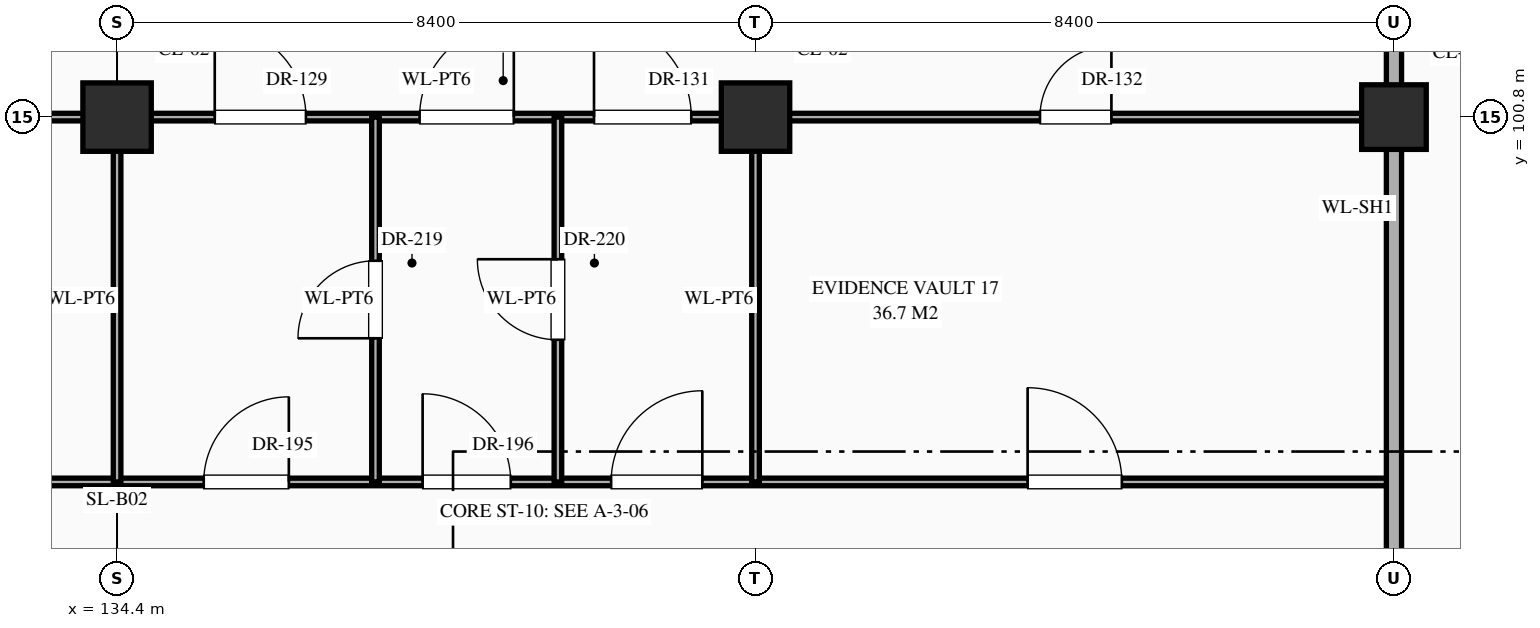
"""IFC4 building model, lengths in metres.
Left out: names, types, materials, properties, quantities, classifications, styles, units other than length and angle.
Written with IfcOpenShell. Run it as: python <this file> out.ifc"""

import sys

from ifc_helpers import new_model, si_unit, direction, frame, frame_2d, origin, origin_2d, place, context, subcontext, project, spatial, rectangle, extrude, element, fill, save


model = new_model("IFC4")
c1 = context("Model", 3, precision=1e-05, world=origin(), true_north=direction((0.0, 1.0)))
c2 = subcontext(c1, "Body", "Model", "MODEL_VIEW")
j1 = project(units=[si_unit("LENGTHUNIT", "METRE"), si_unit("PLANEANGLEUNIT", "RADIAN")], contexts=[c1])
p1 = place(None, origin())
s1 = spatial("IfcSite", under=j1, at=p1, CompositionType="ELEMENT")
p2 = place(p1, origin())
s2 = spatial("IfcBuilding", under=s1, at=p2, CompositionType="ELEMENT")
p3 = place(p2, frame((0.0, 0.0, -10.2)))
s3 = spatial("IfcBuildingStorey", under=s2, at=p3, CompositionType="ELEMENT", Elevation=-10.2)
for number, where, z_axis, x_axis in (
    (1, (134.4, 100.8, 0.0), (0.0, 0.0, 1.0), (1.0, 0.0, 0.0)),
    (2, (142.8, 100.8, 0.0), (0.0, 0.0, 1.0), (1.0, 0.0, 0.0)),
):
    element("IfcColumn", number, at=place(p3, frame(where, z_axis=z_axis, x_axis=x_axis)), inside=s3, PredefinedType="COLUMN", context=c2, shape_type="SweptSolid", body=[
        extrude(rectangle(XDim=0.9, YDim=0.9, at=origin_2d()), origin(), (0.0, 0.0, 1.0), 4.8),
    ])
p4 = place(p3, frame((151.2, 100.8, 0.0), z_axis=(0.0, 0.0, 1.0), x_axis=(1.0, 0.0, 0.0)))
e3 = element("IfcColumn", 3, at=p4, inside=s3, PredefinedType="COLUMN", context=c2, shape_type="SweptSolid", body=[
    extrude(rectangle(XDim=0.85, YDim=0.85, at=origin_2d()), origin(), (0.0, 0.0, 1.0), 4.8),
])
p5 = place(p3, frame((0.04, 96.0, 0.0), z_axis=(0.0, 0.0, 1.0), x_axis=(1.0, 0.0, 0.0)))
e4 = element("IfcWall", 4, at=p5, inside=s3, PredefinedType="STANDARD", context=c2, shape_type="SweptSolid", body=[
    extrude(rectangle(XDim=151.16, YDim=0.1, at=frame_2d((75.58, 0.0))), origin(), (0.0, 0.0, 1.0), 4.48),
])
p6 = place(p5, frame((1.04, 0.0, 0.0)))
e5 = element("IfcOpeningElement", 5, at=p6, cuts=e4, PredefinedType="OPENING", context=c2, shape_type="SweptSolid", body=[
    extrude(rectangle(XDim=1.28, YDim=2.35, at=frame_2d((0.64, 1.175))), frame((0.0, 0.062, 0.0), z_axis=(0.0, -1.0, 0.0), x_axis=(1.0, 0.0, 0.0)), (0.0, 0.0, 1.0), 0.124),
])
p7 = place(p5, frame((4.09, 0.0, 0.0)))
e6 = element("IfcOpeningElement", 6, at=p7, cuts=e4, PredefinedType="OPENING", context=c2, shape_type="SweptSolid", body=[
    extrude(rectangle(XDim=0.94, YDim=2.3, at=frame_2d((0.47, 1.15))), frame((0.0, 0.062, 0.0), z_axis=(0.0, -1.0, 0.0), x_axis=(1.0, 0.0, 0.0)), (0.0, 0.0, 1.0), 0.124),
])
p8 = place(p5, frame((6.57, 0.0, 0.0)))
e7 = element("IfcOpeningElement", 7, at=p8, cuts=e4, PredefinedType="OPENING", context=c2, shape_type="SweptSolid", body=[
    extrude(rectangle(XDim=0.98, YDim=2.35, at=frame_2d((0.49, 1.175))), frame((0.0, 0.062, 0.0), z_axis=(0.0, -1.0, 0.0), x_axis=(1.0, 0.0, 0.0)), (0.0, 0.0, 1.0), 0.124),
])
p9 = place(p5, frame((12.05, 0.0, 0.0)))
e8 = element("IfcOpeningElement", 8, at=p9, cuts=e4, PredefinedType="OPENING", context=c2, shape_type="SweptSolid", body=[
    extrude(rectangle(XDim=1.02, YDim=2.4, at=frame_2d((0.51, 1.2))), frame((0.0, 0.062, 0.0), z_axis=(0.0, -1.0, 0.0), x_axis=(1.0, 0.0, 0.0)), (0.0, 0.0, 1.0), 0.124),
])
p10 = place(p5, frame((20.43, 0.0, 0.0)))
e9 = element("IfcOpeningElement", 9, at=p10, cuts=e4, PredefinedType="OPENING", context=c2, shape_type="SweptSolid", body=[
    extrude(rectangle(XDim=1.06, YDim=2.4, at=frame_2d((0.53, 1.2))), frame((0.0, 0.062, 0.0), z_axis=(0.0, -1.0, 0.0), x_axis=(1.0, 0.0, 0.0)), (0.0, 0.0, 1.0), 0.124),
])
p11 = place(p5, frame((26.29, 0.0, 0.0)))
e10 = element("IfcOpeningElement", 10, at=p11, cuts=e4, PredefinedType="OPENING", context=c2, shape_type="SweptSolid", body=[
    extrude(rectangle(XDim=1.14, YDim=2.4, at=frame_2d((0.57, 1.2))), frame((0.0, 0.062, 0.0), z_axis=(0.0, -1.0, 0.0), x_axis=(1.0, 0.0, 0.0)), (0.0, 0.0, 1.0), 0.124),
])
p12 = place(p5, frame((29.31, 0.0, 0.0)))
e11 = element("IfcOpeningElement", 11, at=p12, cuts=e4, PredefinedType="OPENING", context=c2, shape_type="SweptSolid", body=[
    extrude(rectangle(XDim=0.9, YDim=2.15, at=frame_2d((0.45, 1.075))), frame((0.0, 0.062, 0.0), z_axis=(0.0, -1.0, 0.0), x_axis=(1.0, 0.0, 0.0)), (0.0, 0.0, 1.0), 0.124),
])
p13 = place(p5, frame((31.83, 0.0, 0.0)))
e12 = element("IfcOpeningElement", 12, at=p13, cuts=e4, PredefinedType="OPENING", context=c2, shape_type="SweptSolid", body=[
    extrude(rectangle(XDim=0.86, YDim=2.1, at=frame_2d((0.43, 1.05))), frame((0.0, 0.062, 0.0), z_axis=(0.0, -1.0, 0.0), x_axis=(1.0, 0.0, 0.0)), (0.0, 0.0, 1.0), 0.124),
])
p14 = place(p5, frame((37.3, 0.0, 0.0)))
e13 = element("IfcOpeningElement", 13, at=p14, cuts=e4, PredefinedType="OPENING", context=c2, shape_type="SweptSolid", body=[
    extrude(rectangle(XDim=0.92, YDim=2.15, at=frame_2d((0.46, 1.075))), frame((0.0, 0.062, 0.0), z_axis=(0.0, -1.0, 0.0), x_axis=(1.0, 0.0, 0.0)), (0.0, 0.0, 1.0), 0.124),
])
p15 = place(p5, frame((45.68, 0.0, 0.0)))
e14 = element("IfcOpeningElement", 14, at=p15, cuts=e4, PredefinedType="OPENING", context=c2, shape_type="SweptSolid", body=[
    extrude(rectangle(XDim=0.96, YDim=2.2, at=frame_2d((0.48, 1.1))), frame((0.0, 0.062, 0.0), z_axis=(0.0, -1.0, 0.0), x_axis=(1.0, 0.0, 0.0)), (0.0, 0.0, 1.0), 0.124),
])
p16 = place(p5, frame((51.57, 0.0, 0.0)))
e15 = element("IfcOpeningElement", 15, at=p16, cuts=e4, PredefinedType="OPENING", context=c2, shape_type="SweptSolid", body=[
    extrude(rectangle(XDim=0.98, YDim=2.35, at=frame_2d((0.49, 1.175))), frame((0.0, 0.062, 0.0), z_axis=(0.0, -1.0, 0.0), x_axis=(1.0, 0.0, 0.0)), (0.0, 0.0, 1.0), 0.124),
])
p17 = place(p5, frame((54.45, 0.0, 0.0)))
e16 = element("IfcOpeningElement", 16, at=p17, cuts=e4, PredefinedType="OPENING", context=c2, shape_type="SweptSolid", body=[
    extrude(rectangle(XDim=1.02, YDim=2.4, at=frame_2d((0.51, 1.2))), frame((0.0, 0.062, 0.0), z_axis=(0.0, -1.0, 0.0), x_axis=(1.0, 0.0, 0.0)), (0.0, 0.0, 1.0), 0.124),
])
p18 = place(p5, frame((56.93, 0.0, 0.0)))
e17 = element("IfcOpeningElement", 17, at=p18, cuts=e4, PredefinedType="OPENING", context=c2, shape_type="SweptSolid", body=[
    extrude(rectangle(XDim=1.06, YDim=2.4, at=frame_2d((0.53, 1.2))), frame((0.0, 0.062, 0.0), z_axis=(0.0, -1.0, 0.0), x_axis=(1.0, 0.0, 0.0)), (0.0, 0.0, 1.0), 0.124),
])
p19 = place(p5, frame((62.39, 0.0, 0.0)))
e18 = element("IfcOpeningElement", 18, at=p19, cuts=e4, PredefinedType="OPENING", context=c2, shape_type="SweptSolid", body=[
    extrude(rectangle(XDim=1.14, YDim=2.4, at=frame_2d((0.57, 1.2))), frame((0.0, 0.062, 0.0), z_axis=(0.0, -1.0, 0.0), x_axis=(1.0, 0.0, 0.0)), (0.0, 0.0, 1.0), 0.124),
])
p20 = place(p5, frame((70.91, 0.0, 0.0)))
e19 = element("IfcOpeningElement", 19, at=p20, cuts=e4, PredefinedType="OPENING", context=c2, shape_type="SweptSolid", body=[
    extrude(rectangle(XDim=0.9, YDim=2.15, at=frame_2d((0.45, 1.075))), frame((0.0, 0.062, 0.0), z_axis=(0.0, -1.0, 0.0), x_axis=(1.0, 0.0, 0.0)), (0.0, 0.0, 1.0), 0.124),
])
p21 = place(p5, frame((79.33, 0.0, 0.0)))
e20 = element("IfcOpeningElement", 20, at=p21, cuts=e4, PredefinedType="OPENING", context=c2, shape_type="SweptSolid", body=[
    extrude(rectangle(XDim=0.86, YDim=2.1, at=frame_2d((0.43, 1.05))), frame((0.0, 0.062, 0.0), z_axis=(0.0, -1.0, 0.0), x_axis=(1.0, 0.0, 0.0)), (0.0, 0.0, 1.0), 0.124),
])
p22 = place(p5, frame((85.1, 0.0, 0.0)))
e21 = element("IfcOpeningElement", 21, at=p22, cuts=e4, PredefinedType="OPENING", context=c2, shape_type="SweptSolid", body=[
    extrude(rectangle(XDim=1.12, YDim=2.25, at=frame_2d((0.56, 1.125))), frame((0.0, 0.062, 0.0), z_axis=(0.0, -1.0, 0.0), x_axis=(1.0, 0.0, 0.0)), (0.0, 0.0, 1.0), 0.124),
])
p23 = place(p5, frame((87.98, 0.0, 0.0)))
e22 = element("IfcOpeningElement", 22, at=p23, cuts=e4, PredefinedType="OPENING", context=c2, shape_type="SweptSolid", body=[
    extrude(rectangle(XDim=1.16, YDim=2.3, at=frame_2d((0.58, 1.15))), frame((0.0, 0.062, 0.0), z_axis=(0.0, -1.0, 0.0), x_axis=(1.0, 0.0, 0.0)), (0.0, 0.0, 1.0), 0.124),
])
p24 = place(p5, frame((90.46, 0.0, 0.0)))
e23 = element("IfcOpeningElement", 23, at=p24, cuts=e4, PredefinedType="OPENING", context=c2, shape_type="SweptSolid", body=[
    extrude(rectangle(XDim=1.2, YDim=2.35, at=frame_2d((0.6, 1.175))), frame((0.0, 0.062, 0.0), z_axis=(0.0, -1.0, 0.0), x_axis=(1.0, 0.0, 0.0)), (0.0, 0.0, 1.0), 0.124),
])
p25 = place(p5, frame((95.94, 0.0, 0.0)))
e24 = element("IfcOpeningElement", 24, at=p25, cuts=e4, PredefinedType="OPENING", context=c2, shape_type="SweptSolid", body=[
    extrude(rectangle(XDim=1.24, YDim=2.3, at=frame_2d((0.62, 1.15))), frame((0.0, 0.062, 0.0), z_axis=(0.0, -1.0, 0.0), x_axis=(1.0, 0.0, 0.0)), (0.0, 0.0, 1.0), 0.124),
])
p26 = place(p5, frame((104.32, 0.0, 0.0)))
e25 = element("IfcOpeningElement", 25, at=p26, cuts=e4, PredefinedType="OPENING", context=c2, shape_type="SweptSolid", body=[
    extrude(rectangle(XDim=1.28, YDim=2.35, at=frame_2d((0.64, 1.175))), frame((0.0, 0.062, 0.0), z_axis=(0.0, -1.0, 0.0), x_axis=(1.0, 0.0, 0.0)), (0.0, 0.0, 1.0), 0.124),
])
p27 = place(p5, frame((110.39, 0.0, 0.0)))
e26 = element("IfcOpeningElement", 26, at=p27, cuts=e4, PredefinedType="OPENING", context=c2, shape_type="SweptSolid", body=[
    extrude(rectangle(XDim=0.94, YDim=2.3, at=frame_2d((0.47, 1.15))), frame((0.0, 0.062, 0.0), z_axis=(0.0, -1.0, 0.0), x_axis=(1.0, 0.0, 0.0)), (0.0, 0.0, 1.0), 0.124),
])
p28 = place(p5, frame((113.27, 0.0, 0.0)))
e27 = element("IfcOpeningElement", 27, at=p28, cuts=e4, PredefinedType="OPENING", context=c2, shape_type="SweptSolid", body=[
    extrude(rectangle(XDim=0.98, YDim=2.35, at=frame_2d((0.49, 1.175))), frame((0.0, 0.062, 0.0), z_axis=(0.0, -1.0, 0.0), x_axis=(1.0, 0.0, 0.0)), (0.0, 0.0, 1.0), 0.124),
])
p29 = place(p5, frame((115.75, 0.0, 0.0)))
e28 = element("IfcOpeningElement", 28, at=p29, cuts=e4, PredefinedType="OPENING", context=c2, shape_type="SweptSolid", body=[
    extrude(rectangle(XDim=1.02, YDim=2.4, at=frame_2d((0.51, 1.2))), frame((0.0, 0.062, 0.0), z_axis=(0.0, -1.0, 0.0), x_axis=(1.0, 0.0, 0.0)), (0.0, 0.0, 1.0), 0.124),
])
p30 = place(p5, frame((121.24, 0.0, 0.0)))
e29 = element("IfcOpeningElement", 29, at=p30, cuts=e4, PredefinedType="OPENING", context=c2, shape_type="SweptSolid", body=[
    extrude(rectangle(XDim=1.04, YDim=2.2, at=frame_2d((0.52, 1.1))), frame((0.0, 0.062, 0.0), z_axis=(0.0, -1.0, 0.0), x_axis=(1.0, 0.0, 0.0)), (0.0, 0.0, 1.0), 0.124),
])
p31 = place(p5, frame((129.62, 0.0, 0.0)))
e30 = element("IfcOpeningElement", 30, at=p31, cuts=e4, PredefinedType="OPENING", context=c2, shape_type="SweptSolid", body=[
    extrude(rectangle(XDim=1.08, YDim=2.25, at=frame_2d((0.54, 1.125))), frame((0.0, 0.062, 0.0), z_axis=(0.0, -1.0, 0.0), x_axis=(1.0, 0.0, 0.0)), (0.0, 0.0, 1.0), 0.124),
])
p32 = place(p5, frame((135.5, 0.0, 0.0)))
e31 = element("IfcOpeningElement", 31, at=p32, cuts=e4, PredefinedType="OPENING", context=c2, shape_type="SweptSolid", body=[
    extrude(rectangle(XDim=1.12, YDim=2.25, at=frame_2d((0.56, 1.125))), frame((0.0, 0.062, 0.0), z_axis=(0.0, -1.0, 0.0), x_axis=(1.0, 0.0, 0.0)), (0.0, 0.0, 1.0), 0.124),
])
p33 = place(p5, frame((138.38, 0.0, 0.0)))
e32 = element("IfcOpeningElement", 32, at=p33, cuts=e4, PredefinedType="OPENING", context=c2, shape_type="SweptSolid", body=[
    extrude(rectangle(XDim=1.16, YDim=2.3, at=frame_2d((0.58, 1.15))), frame((0.0, 0.062, 0.0), z_axis=(0.0, -1.0, 0.0), x_axis=(1.0, 0.0, 0.0)), (0.0, 0.0, 1.0), 0.124),
])
p34 = place(p5, frame((140.86, 0.0, 0.0)))
e33 = element("IfcOpeningElement", 33, at=p34, cuts=e4, PredefinedType="OPENING", context=c2, shape_type="SweptSolid", body=[
    extrude(rectangle(XDim=1.2, YDim=2.35, at=frame_2d((0.6, 1.175))), frame((0.0, 0.062, 0.0), z_axis=(0.0, -1.0, 0.0), x_axis=(1.0, 0.0, 0.0)), (0.0, 0.0, 1.0), 0.124),
])
p35 = place(p5, frame((146.34, 0.0, 0.0)))
e34 = element("IfcOpeningElement", 34, at=p35, cuts=e4, PredefinedType="OPENING", context=c2, shape_type="SweptSolid", body=[
    extrude(rectangle(XDim=1.24, YDim=2.3, at=frame_2d((0.62, 1.15))), frame((0.0, 0.062, 0.0), z_axis=(0.0, -1.0, 0.0), x_axis=(1.0, 0.0, 0.0)), (0.0, 0.0, 1.0), 0.124),
])
p36 = place(p3, frame((126.0, 100.8, 0.0), z_axis=(0.0, 0.0, 1.0), x_axis=(1.0, 0.0, 0.0)))
e35 = element("IfcWall", 35, at=p36, inside=s3, PredefinedType="STANDARD", context=c2, shape_type="SweptSolid", body=[
    extrude(rectangle(XDim=25.2, YDim=0.1, at=frame_2d((12.6, 0.0))), origin(), (0.0, 0.0, 1.0), 3.63),
])
p37 = place(p36, frame((3.62, 0.0, 0.0)))
e36 = element("IfcOpeningElement", 36, at=p37, cuts=e35, PredefinedType="OPENING", context=c2, shape_type="SweptSolid", body=[
    extrude(rectangle(XDim=1.16, YDim=2.3, at=frame_2d((0.58, 1.15))), frame((0.0, 0.062, 0.0), z_axis=(0.0, -1.0, 0.0), x_axis=(1.0, 0.0, 0.0)), (0.0, 0.0, 1.0), 0.124),
])
p38 = place(p36, frame((9.685, 0.0, 0.0)))
e37 = element("IfcOpeningElement", 37, at=p38, cuts=e35, PredefinedType="OPENING", context=c2, shape_type="SweptSolid", body=[
    extrude(rectangle(XDim=1.2, YDim=2.35, at=frame_2d((0.6, 1.175))), frame((0.0, 0.062, 0.0), z_axis=(0.0, -1.0, 0.0), x_axis=(1.0, 0.0, 0.0)), (0.0, 0.0, 1.0), 0.124),
])
p39 = place(p36, frame((12.38, 0.0, 0.0)))
e38 = element("IfcOpeningElement", 38, at=p39, cuts=e35, PredefinedType="OPENING", context=c2, shape_type="SweptSolid", body=[
    extrude(rectangle(XDim=1.24, YDim=2.3, at=frame_2d((0.62, 1.15))), frame((0.0, 0.062, 0.0), z_axis=(0.0, -1.0, 0.0), x_axis=(1.0, 0.0, 0.0)), (0.0, 0.0, 1.0), 0.124),
])
p40 = place(p36, frame((14.675, 0.0, 0.0)))
e39 = element("IfcOpeningElement", 39, at=p40, cuts=e35, PredefinedType="OPENING", context=c2, shape_type="SweptSolid", body=[
    extrude(rectangle(XDim=1.28, YDim=2.35, at=frame_2d((0.64, 1.175))), frame((0.0, 0.062, 0.0), z_axis=(0.0, -1.0, 0.0), x_axis=(1.0, 0.0, 0.0)), (0.0, 0.0, 1.0), 0.124),
])
p41 = place(p36, frame((20.542, 0.0, 0.0)))
e40 = element("IfcOpeningElement", 40, at=p41, cuts=e35, PredefinedType="OPENING", context=c2, shape_type="SweptSolid", body=[
    extrude(rectangle(XDim=0.94, YDim=2.3, at=frame_2d((0.47, 1.15))), frame((0.0, 0.062, 0.0), z_axis=(0.0, -1.0, 0.0), x_axis=(1.0, 0.0, 0.0)), (0.0, 0.0, 1.0), 0.124),
])
p42 = place(p3, frame((134.4, 96.0, 0.0), z_axis=(0.0, 0.0, 1.0), x_axis=(0.0, 1.0, 0.0)))
e41 = element("IfcWall", 41, at=p42, inside=s3, PredefinedType="STANDARD", context=c2, shape_type="SweptSolid", body=[
    extrude(rectangle(XDim=4.8, YDim=0.1, at=frame_2d((2.4, 0.0))), origin(), (0.0, 0.0, 1.0), 3.73),
])
p43 = place(p3, frame((137.8, 96.0, 0.0), z_axis=(0.0, 0.0, 1.0), x_axis=(0.0, 1.0, 0.0)))
e42 = element("IfcWall", 42, at=p43, inside=s3, PredefinedType="STANDARD", context=c2, shape_type="SweptSolid", body=[
    extrude(rectangle(XDim=4.8, YDim=0.1, at=frame_2d((2.4, 0.0))), origin(), (0.0, 0.0, 1.0), 4.48),
])
p44 = place(p43, frame((1.89, 0.0, 0.0)))
e43 = element("IfcOpeningElement", 43, at=p44, cuts=e42, PredefinedType="OPENING", context=c2, shape_type="SweptSolid", body=[
    extrude(rectangle(XDim=1.02, YDim=2.4, at=frame_2d((0.51, 1.2))), frame((0.0, 0.062, 0.0), z_axis=(0.0, -1.0, 0.0), x_axis=(1.0, 0.0, 0.0)), (0.0, 0.0, 1.0), 0.124),
])
p45 = place(p3, frame((140.2, 96.0, 0.0), z_axis=(0.0, 0.0, 1.0), x_axis=(0.0, 1.0, 0.0)))
e44 = element("IfcWall", 44, at=p45, inside=s3, PredefinedType="STANDARD", context=c2, shape_type="SweptSolid", body=[
    extrude(rectangle(XDim=4.8, YDim=0.1, at=frame_2d((2.4, 0.0))), origin(), (0.0, 0.0, 1.0), 4.48),
])
p46 = place(p45, frame((1.87, 0.0, 0.0)))
e45 = element("IfcOpeningElement", 45, at=p46, cuts=e44, PredefinedType="OPENING", context=c2, shape_type="SweptSolid", body=[
    extrude(rectangle(XDim=1.06, YDim=2.4, at=frame_2d((0.53, 1.2))), frame((0.0, 0.062, 0.0), z_axis=(0.0, -1.0, 0.0), x_axis=(1.0, 0.0, 0.0)), (0.0, 0.0, 1.0), 0.124),
])
p47 = place(p3, frame((142.8, 96.0, 0.0), z_axis=(0.0, 0.0, 1.0), x_axis=(0.0, 1.0, 0.0)))
e46 = element("IfcWall", 46, at=p47, inside=s3, PredefinedType="STANDARD", context=c2, shape_type="SweptSolid", body=[
    extrude(rectangle(XDim=4.8, YDim=0.1, at=frame_2d((2.4, 0.0))), origin(), (0.0, 0.0, 1.0), 3.73),
])
p48 = place(p3, frame((151.2, 91.2, 0.0), z_axis=(0.0, 0.0, 1.0), x_axis=(0.0, 1.0, 0.0)))
e47 = element("IfcWall", 47, at=p48, inside=s3, PredefinedType="STANDARD", context=c2, shape_type="SweptSolid", body=[
    extrude(rectangle(XDim=16.8, YDim=0.2, at=frame_2d((8.4, 0.0))), origin(), (0.0, 0.0, 1.0), 3.73),
])
p49 = place(p38, origin())
e48 = element("IfcDoor", 48, at=p49, inside=s3, OperationType="SINGLE_SWING_LEFT", PredefinedType="DOOR", context=c2, shape_type="SweptSolid", body=[
    extrude(rectangle(XDim=1.2, YDim=2.35, at=frame_2d((0.6, 1.175))), frame((0.0, 0.025, 0.0), z_axis=(0.0, -1.0, 0.0), x_axis=(1.0, 0.0, 0.0)), (0.0, 0.0, 1.0), 0.05),
])
fill(e37, e48)
p50 = place(p39, origin())
e49 = element("IfcDoor", 49, at=p50, inside=s3, OperationType="SINGLE_SWING_RIGHT", PredefinedType="DOOR", context=c2, shape_type="SweptSolid", body=[
    extrude(rectangle(XDim=1.24, YDim=2.3, at=frame_2d((0.62, 1.15))), frame((0.0, 0.025, 0.0), z_axis=(0.0, -1.0, 0.0), x_axis=(1.0, 0.0, 0.0)), (0.0, 0.0, 1.0), 0.05),
])
fill(e38, e49)
p51 = place(p40, origin())
e50 = element("IfcDoor", 50, at=p51, inside=s3, OperationType="SINGLE_SWING_LEFT", PredefinedType="DOOR", context=c2, shape_type="SweptSolid", body=[
    extrude(rectangle(XDim=1.28, YDim=2.35, at=frame_2d((0.64, 1.175))), frame((0.0, 0.025, 0.0), z_axis=(0.0, -1.0, 0.0), x_axis=(1.0, 0.0, 0.0)), (0.0, 0.0, 1.0), 0.05),
])
fill(e39, e50)
p52 = place(p41, origin())
e51 = element("IfcDoor", 51, at=p52, inside=s3, OperationType="SINGLE_SWING_RIGHT", PredefinedType="DOOR", context=c2, shape_type="SweptSolid", body=[
    extrude(rectangle(XDim=0.94, YDim=2.3, at=frame_2d((0.47, 1.15))), frame((0.0, 0.025, 0.0), z_axis=(0.0, -1.0, 0.0), x_axis=(1.0, 0.0, 0.0)), (0.0, 0.0, 1.0), 0.05),
])
fill(e40, e51)
p53 = place(p32, origin())
e52 = element("IfcDoor", 52, at=p53, inside=s3, OperationType="SINGLE_SWING_RIGHT", PredefinedType="DOOR", context=c2, shape_type="SweptSolid", body=[
    extrude(rectangle(XDim=1.12, YDim=2.25, at=frame_2d((0.56, 1.125))), frame((0.0, 0.025, 0.0), z_axis=(0.0, -1.0, 0.0), x_axis=(1.0, 0.0, 0.0)), (0.0, 0.0, 1.0), 0.05),
])
fill(e31, e52)
p54 = place(p33, origin())
e53 = element("IfcDoor", 53, at=p54, inside=s3, OperationType="SINGLE_SWING_LEFT", PredefinedType="DOOR", context=c2, shape_type="SweptSolid", body=[
    extrude(rectangle(XDim=1.16, YDim=2.3, at=frame_2d((0.58, 1.15))), frame((0.0, 0.025, 0.0), z_axis=(0.0, -1.0, 0.0), x_axis=(1.0, 0.0, 0.0)), (0.0, 0.0, 1.0), 0.05),
])
fill(e32, e53)
p55 = place(p34, origin())
e54 = element("IfcDoor", 54, at=p55, inside=s3, OperationType="SINGLE_SWING_RIGHT", PredefinedType="DOOR", context=c2, shape_type="SweptSolid", body=[
    extrude(rectangle(XDim=1.2, YDim=2.35, at=frame_2d((0.6, 1.175))), frame((0.0, 0.025, 0.0), z_axis=(0.0, -1.0, 0.0), x_axis=(1.0, 0.0, 0.0)), (0.0, 0.0, 1.0), 0.05),
])
fill(e33, e54)
p56 = place(p35, origin())
e55 = element("IfcDoor", 55, at=p56, inside=s3, OperationType="SINGLE_SWING_LEFT", PredefinedType="DOOR", context=c2, shape_type="SweptSolid", body=[
    extrude(rectangle(XDim=1.24, YDim=2.3, at=frame_2d((0.62, 1.15))), frame((0.0, 0.025, 0.0), z_axis=(0.0, -1.0, 0.0), x_axis=(1.0, 0.0, 0.0)), (0.0, 0.0, 1.0), 0.05),
])
fill(e34, e55)
p57 = place(p44, origin())
e56 = element("IfcDoor", 56, at=p57, inside=s3, OperationType="SINGLE_SWING_LEFT", PredefinedType="DOOR", context=c2, shape_type="SweptSolid", body=[
    extrude(rectangle(XDim=1.02, YDim=2.4, at=frame_2d((0.51, 1.2))), frame((0.0, 0.025, 0.0), z_axis=(0.0, -1.0, 0.0), x_axis=(1.0, 0.0, 0.0)), (0.0, 0.0, 1.0), 0.05),
])
fill(e43, e56)
p58 = place(p46, origin())
e57 = element("IfcDoor", 57, at=p58, inside=s3, OperationType="SINGLE_SWING_RIGHT", PredefinedType="DOOR", context=c2, shape_type="SweptSolid", body=[
    extrude(rectangle(XDim=1.06, YDim=2.4, at=frame_2d((0.53, 1.2))), frame((0.0, 0.025, 0.0), z_axis=(0.0, -1.0, 0.0), x_axis=(1.0, 0.0, 0.0)), (0.0, 0.0, 1.0), 0.05),
])
fill(e45, e57)
save(model, sys.argv[1])
